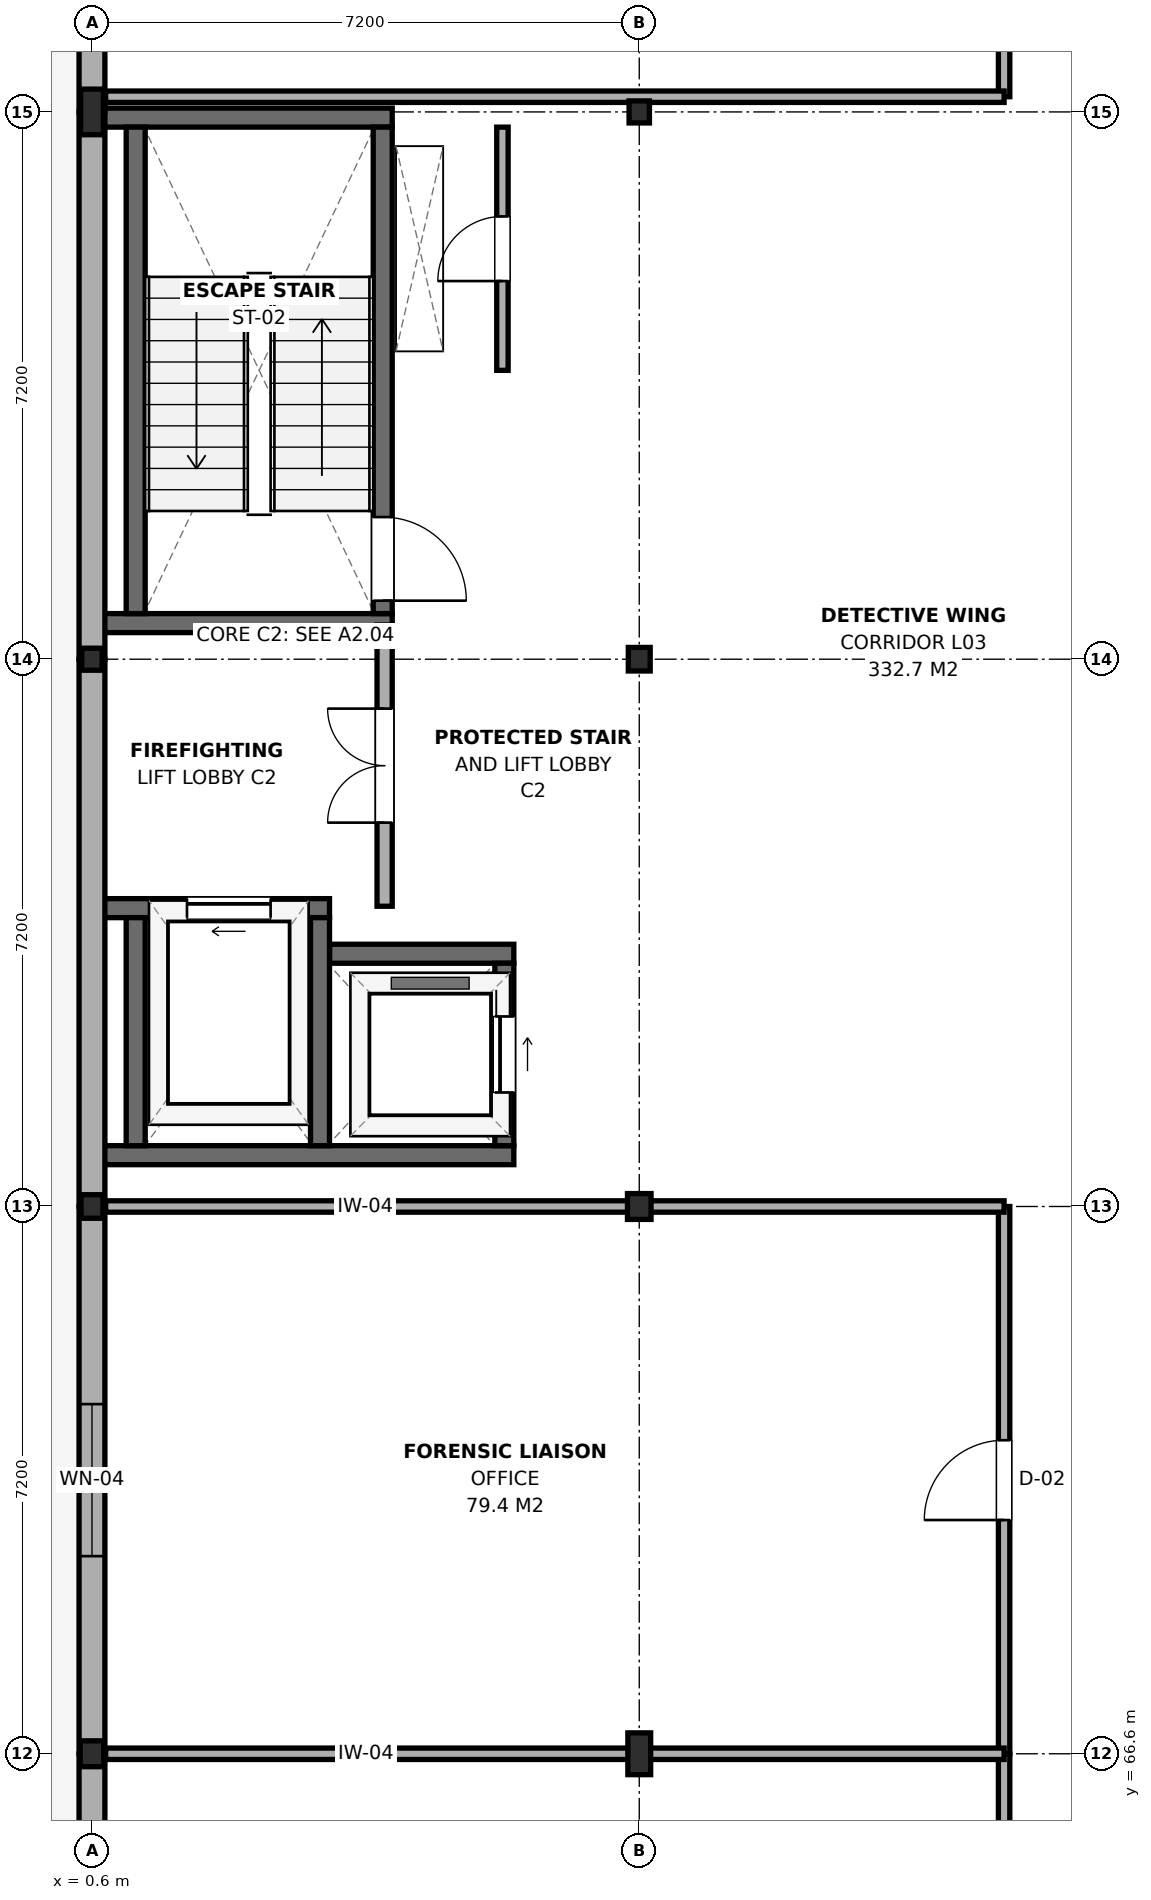
"""IFC4 building model, lengths in metres.
Left out: names, types, materials, properties, quantities, classifications, styles, units other than length and angle.
Written with IfcOpenShell. Run it as: python <this file> out.ifc"""

import sys

from ifc_helpers import new_model, si_unit, direction, frame, frame_2d, origin, origin_2d, place, context, subcontext, project, spatial, rectangle, i_section, extrude, element, fill, save


model = new_model("IFC4")
c1 = context("Model", 3, precision=1e-05, world=origin(), true_north=direction((0.0, 1.0)))
c2 = subcontext(c1, "Body", "Model", "MODEL_VIEW")
j1 = project(units=[si_unit("LENGTHUNIT", "METRE"), si_unit("PLANEANGLEUNIT", "RADIAN")], contexts=[c1])
p1 = place(None, origin())
s1 = spatial("IfcSite", under=j1, at=p1, CompositionType="ELEMENT")
p2 = place(p1, origin())
s2 = spatial("IfcBuilding", under=s1, at=p2, CompositionType="ELEMENT")
p3 = place(p2, frame((0.0, 0.0, 13.2)))
s3 = spatial("IfcBuildingStorey", under=s2, at=p3, CompositionType="ELEMENT", Elevation=13.2)
p4 = place(p3, frame((0.6, 66.6, 0.0), z_axis=(0.0, 0.0, 1.0), x_axis=(1.0, 0.0, 0.0)))
e1 = element("IfcColumn", 1, at=p4, inside=s3, PredefinedType="COLUMN", context=c2, shape_type="SweptSolid", body=[
    extrude(i_section(OverallWidth=0.31, OverallDepth=0.34, WebThickness=0.021, FlangeThickness=0.039, FilletRadius=0.027, at=origin_2d()), origin(), (0.0, 0.0, 1.0), 3.9),
])
p5 = place(p3, frame((0.6, 73.8, 0.0), z_axis=(0.0, 0.0, 1.0), x_axis=(1.0, 0.0, 0.0)))
e2 = element("IfcColumn", 2, at=p5, inside=s3, PredefinedType="COLUMN", context=c2, shape_type="SweptSolid", body=[
    extrude(i_section(OverallWidth=0.288, OverallDepth=0.31, WebThickness=0.019, FlangeThickness=0.033, FilletRadius=0.024, at=origin_2d()), origin(), (0.0, 0.0, 1.0), 3.9),
])
p6 = place(p3, frame((0.6, 81.0, 0.0), z_axis=(0.0, 0.0, 1.0), x_axis=(1.0, 0.0, 0.0)))
e3 = element("IfcColumn", 3, at=p6, inside=s3, PredefinedType="COLUMN", context=c2, shape_type="SweptSolid", body=[
    extrude(i_section(OverallWidth=0.268, OverallDepth=0.29, WebThickness=0.018, FlangeThickness=0.032, FilletRadius=0.024, at=origin_2d()), origin(), (0.0, 0.0, 1.0), 3.9),
])
p7 = place(p3, frame((0.6, 88.2, 0.0), z_axis=(0.0, 0.0, 1.0), x_axis=(1.0, 0.0, 0.0)))
e4 = element("IfcColumn", 4, at=p7, inside=s3, PredefinedType="COLUMN", context=c2, shape_type="SweptSolid", body=[
    extrude(i_section(OverallWidth=0.3, OverallDepth=0.6, WebThickness=0.015, FlangeThickness=0.03, FilletRadius=0.027, at=origin_2d()), origin(), (0.0, 0.0, 1.0), 3.9),
])
p8 = place(p3, frame((7.8, 66.6, 0.0), z_axis=(0.0, 0.0, 1.0), x_axis=(1.0, 0.0, 0.0)))
e5 = element("IfcColumn", 5, at=p8, inside=s3, PredefinedType="COLUMN", context=c2, shape_type="SweptSolid", body=[
    extrude(i_section(OverallWidth=0.3, OverallDepth=0.55, WebThickness=0.015, FlangeThickness=0.029, FilletRadius=0.027, at=origin_2d()), origin(), (0.0, 0.0, 1.0), 3.9),
])
p9 = place(p3, frame((7.8, 73.8, 0.0), z_axis=(0.0, 0.0, 1.0), x_axis=(1.0, 0.0, 0.0)))
e6 = element("IfcColumn", 6, at=p9, inside=s3, PredefinedType="COLUMN", context=c2, shape_type="SweptSolid", body=[
    extrude(i_section(OverallWidth=0.31, OverallDepth=0.34, WebThickness=0.021, FlangeThickness=0.039, FilletRadius=0.027, at=origin_2d()), origin(), (0.0, 0.0, 1.0), 3.9),
])
p10 = place(p3, frame((7.8, 81.0, 0.0), z_axis=(0.0, 0.0, 1.0), x_axis=(1.0, 0.0, 0.0)))
e7 = element("IfcColumn", 7, at=p10, inside=s3, PredefinedType="COLUMN", context=c2, shape_type="SweptSolid", body=[
    extrude(i_section(OverallWidth=0.288, OverallDepth=0.31, WebThickness=0.019, FlangeThickness=0.033, FilletRadius=0.024, at=origin_2d()), origin(), (0.0, 0.0, 1.0), 3.9),
])
p11 = place(p3, frame((7.8, 88.2, 0.0), z_axis=(0.0, 0.0, 1.0), x_axis=(1.0, 0.0, 0.0)))
e8 = element("IfcColumn", 8, at=p11, inside=s3, PredefinedType="COLUMN", context=c2, shape_type="SweptSolid", body=[
    extrude(i_section(OverallWidth=0.268, OverallDepth=0.29, WebThickness=0.018, FlangeThickness=0.032, FilletRadius=0.024, at=origin_2d()), origin(), (0.0, 0.0, 1.0), 3.9),
])
for number, where, z_axis, x_axis in (
    (9, (0.75, 81.475, 0.0), (0.0, 0.0, 1.0), (1.0, 0.0, 0.0)),
    (10, (0.75, 88.125, 0.0), (0.0, 0.0, 1.0), (1.0, 0.0, 0.0)),
):
    element("IfcWall", number, at=place(p3, frame(where, z_axis=z_axis, x_axis=x_axis)), inside=s3, PredefinedType="SHEAR", context=c2, shape_type="SweptSolid", body=[
        extrude(rectangle(XDim=3.8, YDim=0.25, at=frame_2d((1.9, 0.0))), origin(), (0.0, 0.0, 1.0), 3.7),
    ])
p12 = place(p3, frame((1.175, 81.6, 0.0), z_axis=(0.0, 0.0, 1.0), x_axis=(0.0, 1.0, 0.0)))
e11 = element("IfcWall", 11, at=p12, inside=s3, PredefinedType="SHEAR", context=c2, shape_type="SweptSolid", body=[
    extrude(rectangle(XDim=6.4, YDim=0.25, at=frame_2d((3.2, 0.0))), origin(), (0.0, 0.0, 1.0), 3.7),
])
p13 = place(p3, frame((4.425, 81.6, 0.0), z_axis=(0.0, 0.0, 1.0), x_axis=(0.0, 1.0, 0.0)))
e12 = element("IfcWall", 12, at=p13, inside=s3, PredefinedType="SHEAR", context=c2, shape_type="SweptSolid", body=[
    extrude(rectangle(XDim=6.4, YDim=0.25, at=frame_2d((3.2, 0.0))), origin(), (0.0, 0.0, 1.0), 3.7),
])
p14 = place(p13, frame((0.17, 0.0, 0.0)))
e13 = element("IfcOpeningElement", 13, at=p14, cuts=e12, PredefinedType="OPENING", context=c2, shape_type="SweptSolid", body=[
    extrude(rectangle(XDim=1.1, YDim=2.15, at=frame_2d((0.55, 1.075))), frame((0.0, 0.14, 0.0), z_axis=(0.0, -1.0, 0.0), x_axis=(1.0, 0.0, 0.0)), (0.0, 0.0, 1.0), 0.28),
])
p15 = place(p3, frame((0.75, 74.475, 0.0), z_axis=(0.0, 0.0, 1.0), x_axis=(1.0, 0.0, 0.0)))
e14 = element("IfcWall", 14, at=p15, inside=s3, PredefinedType="SHEAR", context=c2, shape_type="SweptSolid", body=[
    extrude(rectangle(XDim=5.4, YDim=0.25, at=frame_2d((2.7, 0.0))), origin(), (0.0, 0.0, 1.0), 3.7),
])
p16 = place(p3, frame((0.75, 77.725, 0.0), z_axis=(0.0, 0.0, 1.0), x_axis=(1.0, 0.0, 0.0)))
e15 = element("IfcWall", 15, at=p16, inside=s3, PredefinedType="SHEAR", context=c2, shape_type="SweptSolid", body=[
    extrude(rectangle(XDim=2.975, YDim=0.25, at=frame_2d((1.488, 0.0))), origin(), (0.0, 0.0, 1.0), 3.7),
])
p17 = place(p16, frame((1.1, 0.0, 0.0)))
e16 = element("IfcOpeningElement", 16, at=p17, cuts=e15, PredefinedType="OPENING", context=c2, shape_type="SweptSolid", body=[
    extrude(rectangle(XDim=1.1, YDim=2.15, at=frame_2d((0.55, 1.075))), frame((0.0, 0.14, 0.0), z_axis=(0.0, -1.0, 0.0), x_axis=(1.0, 0.0, 0.0)), (0.0, 0.0, 1.0), 0.28),
])
p18 = place(p3, frame((3.725, 77.125, 0.0), z_axis=(0.0, 0.0, 1.0), x_axis=(1.0, 0.0, 0.0)))
e17 = element("IfcWall", 17, at=p18, inside=s3, PredefinedType="SHEAR", context=c2, shape_type="SweptSolid", body=[
    extrude(rectangle(XDim=2.425, YDim=0.25, at=frame_2d((1.212, 0.0))), origin(), (0.0, 0.0, 1.0), 3.7),
])
for number, where, z_axis, x_axis in (
    (18, (1.175, 74.6, 0.0), (0.0, 0.0, 1.0), (0.0, 1.0, 0.0)),
    (19, (3.6, 74.6, 0.0), (0.0, 0.0, 1.0), (0.0, 1.0, 0.0)),
):
    element("IfcWall", number, at=place(p3, frame(where, z_axis=z_axis, x_axis=x_axis)), inside=s3, PredefinedType="SHEAR", context=c2, shape_type="SweptSolid", body=[
        extrude(rectangle(XDim=3.0, YDim=0.25, at=frame_2d((1.5, 0.0))), origin(), (0.0, 0.0, 1.0), 3.7),
    ])
p19 = place(p3, frame((6.025, 74.6, 0.0), z_axis=(0.0, 0.0, 1.0), x_axis=(0.0, 1.0, 0.0)))
e20 = element("IfcWall", 20, at=p19, inside=s3, PredefinedType="SHEAR", context=c2, shape_type="SweptSolid", body=[
    extrude(rectangle(XDim=2.4, YDim=0.25, at=frame_2d((1.2, 0.0))), origin(), (0.0, 0.0, 1.0), 3.7),
])
p20 = place(p19, frame((0.7, 0.0, 0.0)))
e21 = element("IfcOpeningElement", 21, at=p20, cuts=e20, PredefinedType="OPENING", context=c2, shape_type="SweptSolid", body=[
    extrude(rectangle(XDim=1.0, YDim=2.15, at=frame_2d((0.5, 1.075))), frame((0.0, 0.14, 0.0), z_axis=(0.0, -1.0, 0.0), x_axis=(1.0, 0.0, 0.0)), (0.0, 0.0, 1.0), 0.28),
])
p21 = place(p3, frame((0.6, 58.8, 0.0), z_axis=(0.0, 0.0, 1.0), x_axis=(0.0, 1.0, 0.0)))
e22 = element("IfcWall", 22, at=p21, inside=s3, PredefinedType="SOLIDWALL", context=c2, shape_type="SweptSolid", body=[
    extrude(rectangle(XDim=7.8, YDim=0.34, at=frame_2d((3.9, 0.0))), origin(), (0.0, 0.0, 1.0), 3.195),
])
p22 = place(p21, frame((2.9, 0.0, 0.9)))
e23 = element("IfcOpeningElement", 23, at=p22, cuts=e22, PredefinedType="OPENING", context=c2, shape_type="SweptSolid", body=[
    extrude(rectangle(XDim=2.0, YDim=1.8, at=frame_2d((1.0, 0.9))), frame((0.0, 0.185, 0.0), z_axis=(0.0, -1.0, 0.0), x_axis=(1.0, 0.0, 0.0)), (0.0, 0.0, 1.0), 0.37),
])
p23 = place(p3, frame((0.6, 66.6, 0.0), z_axis=(0.0, 0.0, 1.0), x_axis=(0.0, 1.0, 0.0)))
e24 = element("IfcWall", 24, at=p23, inside=s3, PredefinedType="SOLIDWALL", context=c2, shape_type="SweptSolid", body=[
    extrude(rectangle(XDim=7.2, YDim=0.34, at=frame_2d((3.6, 0.0))), origin(), (0.0, 0.0, 1.0), 3.195),
])
p24 = place(p23, frame((2.6, 0.0, 0.9)))
e25 = element("IfcOpeningElement", 25, at=p24, cuts=e24, PredefinedType="OPENING", context=c2, shape_type="SweptSolid", body=[
    extrude(rectangle(XDim=2.0, YDim=1.8, at=frame_2d((1.0, 0.9))), frame((0.0, 0.185, 0.0), z_axis=(0.0, -1.0, 0.0), x_axis=(1.0, 0.0, 0.0)), (0.0, 0.0, 1.0), 0.37),
])
p25 = place(p3, frame((0.6, 73.8, 0.0), z_axis=(0.0, 0.0, 1.0), x_axis=(0.0, 1.0, 0.0)))
e26 = element("IfcWall", 26, at=p25, inside=s3, PredefinedType="SOLIDWALL", context=c2, shape_type="SweptSolid", body=[
    extrude(rectangle(XDim=7.2, YDim=0.34, at=frame_2d((3.6, 0.0))), origin(), (0.0, 0.0, 1.0), 3.245),
])
p26 = place(p3, frame((0.6, 81.0, 0.0), z_axis=(0.0, 0.0, 1.0), x_axis=(0.0, 1.0, 0.0)))
e27 = element("IfcWall", 27, at=p26, inside=s3, PredefinedType="SOLIDWALL", context=c2, shape_type="SweptSolid", body=[
    extrude(rectangle(XDim=7.2, YDim=0.34, at=frame_2d((3.6, 0.0))), origin(), (0.0, 0.0, 1.0), 3.345),
])
p27 = place(p3, frame((0.6, 88.2, 0.0), z_axis=(0.0, 0.0, 1.0), x_axis=(0.0, 1.0, 0.0)))
e28 = element("IfcWall", 28, at=p27, inside=s3, PredefinedType="SOLIDWALL", context=c2, shape_type="SweptSolid", body=[
    extrude(rectangle(XDim=7.8, YDim=0.34, at=frame_2d((3.9, 0.0))), origin(), (0.0, 0.0, 1.0), 3.095),
])
p28 = place(p3, frame((4.45, 77.75, 0.0), z_axis=(0.0, 0.0, 1.0), x_axis=(0.0, 1.0, 0.0)))
e29 = element("IfcWall", 29, at=p28, inside=s3, PredefinedType="PARTITIONING", context=c2, shape_type="SweptSolid", body=[
    extrude(rectangle(XDim=3.7, YDim=0.2, at=frame_2d((1.85, 0.0))), origin(), (0.0, 0.0, 1.0), 3.095),
])
p29 = place(p28, frame((1.1, 0.0, 0.0)))
e30 = element("IfcOpeningElement", 30, at=p29, cuts=e29, PredefinedType="OPENING", context=c2, shape_type="SweptSolid", body=[
    extrude(rectangle(XDim=1.5, YDim=2.15, at=frame_2d((0.75, 1.075))), frame((0.0, 0.115, 0.0), z_axis=(0.0, -1.0, 0.0), x_axis=(1.0, 0.0, 0.0)), (0.0, 0.0, 1.0), 0.23),
])
p30 = place(p3, frame((6.0, 84.8, 0.0), z_axis=(0.0, 0.0, 1.0), x_axis=(0.0, 1.0, 0.0)))
e31 = element("IfcWall", 31, at=p30, inside=s3, PredefinedType="PARTITIONING", context=c2, shape_type="SweptSolid", body=[
    extrude(rectangle(XDim=3.2, YDim=0.15, at=frame_2d((1.6, 0.0))), origin(), (0.0, 0.0, 1.0), 3.245),
])
p31 = place(p30, frame((1.175, 0.0, 0.0)))
e32 = element("IfcOpeningElement", 32, at=p31, cuts=e31, PredefinedType="OPENING", context=c2, shape_type="SweptSolid", body=[
    extrude(rectangle(XDim=0.85, YDim=2.1, at=frame_2d((0.425, 1.05))), frame((0.0, 0.09, 0.0), z_axis=(0.0, -1.0, 0.0), x_axis=(1.0, 0.0, 0.0)), (0.0, 0.0, 1.0), 0.18),
])
p32 = place(p3, frame((12.6, 53.2, 0.0), z_axis=(0.0, 0.0, 1.0), x_axis=(0.0, 1.0, 0.0)))
e33 = element("IfcWall", 33, at=p32, inside=s3, PredefinedType="PARTITIONING", context=c2, shape_type="SweptSolid", body=[
    extrude(rectangle(XDim=13.4, YDim=0.15, at=frame_2d((6.7, 0.0))), origin(), (0.0, 0.0, 1.0), 3.145),
])
p33 = place(p32, frame((6.175, 0.0, 0.0)))
e34 = element("IfcOpeningElement", 34, at=p33, cuts=e33, PredefinedType="OPENING", context=c2, shape_type="SweptSolid", body=[
    extrude(rectangle(XDim=1.05, YDim=2.15, at=frame_2d((0.525, 1.075))), frame((0.0, 0.09, 0.0), z_axis=(0.0, -1.0, 0.0), x_axis=(1.0, 0.0, 0.0)), (0.0, 0.0, 1.0), 0.18),
])
p34 = place(p32, frame((8.348, 0.0, 0.95)))
e35 = element("IfcOpeningElement", 35, at=p34, cuts=e33, PredefinedType="OPENING", context=c2, shape_type="SweptSolid", body=[
    extrude(rectangle(XDim=2.6, YDim=1.5, at=frame_2d((1.3, 0.75))), frame((0.0, 0.09, 0.0), z_axis=(0.0, -1.0, 0.0), x_axis=(1.0, 0.0, 0.0)), (0.0, 0.0, 1.0), 0.18),
])
p35 = place(p3, frame((12.6, 66.6, 0.0), z_axis=(0.0, 0.0, 1.0), x_axis=(0.0, 1.0, 0.0)))
e36 = element("IfcWall", 36, at=p35, inside=s3, PredefinedType="PARTITIONING", context=c2, shape_type="SweptSolid", body=[
    extrude(rectangle(XDim=7.2, YDim=0.15, at=frame_2d((3.6, 0.0))), origin(), (0.0, 0.0, 1.0), 3.145),
])
p36 = place(p35, frame((3.075, 0.0, 0.0)))
e37 = element("IfcOpeningElement", 37, at=p36, cuts=e36, PredefinedType="OPENING", context=c2, shape_type="SweptSolid", body=[
    extrude(rectangle(XDim=1.05, YDim=2.15, at=frame_2d((0.525, 1.075))), frame((0.0, 0.09, 0.0), z_axis=(0.0, -1.0, 0.0), x_axis=(1.0, 0.0, 0.0)), (0.0, 0.0, 1.0), 0.18),
])
p37 = place(p3, frame((0.78, 66.6, 0.0), z_axis=(0.0, 0.0, 1.0), x_axis=(1.0, 0.0, 0.0)))
e38 = element("IfcWall", 38, at=p37, inside=s3, PredefinedType="PARTITIONING", context=c2, shape_type="SweptSolid", body=[
    extrude(rectangle(XDim=11.82, YDim=0.15, at=frame_2d((5.91, 0.0))), origin(), (0.0, 0.0, 1.0), 3.095),
])
p38 = place(p3, frame((0.78, 73.8, 0.0), z_axis=(0.0, 0.0, 1.0), x_axis=(1.0, 0.0, 0.0)))
e39 = element("IfcWall", 39, at=p38, inside=s3, PredefinedType="PARTITIONING", context=c2, shape_type="SweptSolid", body=[
    extrude(rectangle(XDim=11.82, YDim=0.15, at=frame_2d((5.91, 0.0))), origin(), (0.0, 0.0, 1.0), 3.245),
])
p39 = place(p3, frame((12.6, 88.4, 0.0), z_axis=(0.0, 0.0, 1.0), x_axis=(0.0, 1.0, 0.0)))
e40 = element("IfcWall", 40, at=p39, inside=s3, PredefinedType="PARTITIONING", context=c2, shape_type="SweptSolid", body=[
    extrude(rectangle(XDim=19.6, YDim=0.15, at=frame_2d((9.8, 0.0))), origin(), (0.0, 0.0, 1.0), 3.145),
])
p40 = place(p39, frame((9.0, 0.0, 0.0)))
e41 = element("IfcOpeningElement", 41, at=p40, cuts=e40, PredefinedType="OPENING", context=c2, shape_type="SweptSolid", body=[
    extrude(rectangle(XDim=1.6, YDim=2.15, at=frame_2d((0.8, 1.075))), frame((0.0, 0.09, 0.0), z_axis=(0.0, -1.0, 0.0), x_axis=(1.0, 0.0, 0.0)), (0.0, 0.0, 1.0), 0.18),
])
p41 = place(p39, frame((3.6, 0.0, 0.95)))
e42 = element("IfcOpeningElement", 42, at=p41, cuts=e40, PredefinedType="OPENING", context=c2, shape_type="SweptSolid", body=[
    extrude(rectangle(XDim=2.6, YDim=1.5, at=frame_2d((1.3, 0.75))), frame((0.0, 0.09, 0.0), z_axis=(0.0, -1.0, 0.0), x_axis=(1.0, 0.0, 0.0)), (0.0, 0.0, 1.0), 0.18),
])
p42 = place(p39, frame((13.4, 0.0, 0.95)))
e43 = element("IfcOpeningElement", 43, at=p42, cuts=e40, PredefinedType="OPENING", context=c2, shape_type="SweptSolid", body=[
    extrude(rectangle(XDim=2.6, YDim=1.5, at=frame_2d((1.3, 0.75))), frame((0.0, 0.09, 0.0), z_axis=(0.0, -1.0, 0.0), x_axis=(1.0, 0.0, 0.0)), (0.0, 0.0, 1.0), 0.18),
])
p43 = place(p3, frame((0.78, 88.4, 0.0), z_axis=(0.0, 0.0, 1.0), x_axis=(1.0, 0.0, 0.0)))
e44 = element("IfcWall", 44, at=p43, inside=s3, PredefinedType="PARTITIONING", context=c2, shape_type="SweptSolid", body=[
    extrude(rectangle(XDim=11.82, YDim=0.15, at=frame_2d((5.91, 0.0))), origin(), (0.0, 0.0, 1.0), 3.095),
])
p44 = place(p24, origin())
e45 = element("IfcWindow", 45, at=p44, inside=s3, PartitioningType="SINGLE_PANEL", PredefinedType="WINDOW", context=c2, shape_type="SweptSolid", body=[
    extrude(rectangle(XDim=2.0, YDim=1.8, at=frame_2d((1.0, 0.9))), frame((0.0, 0.03, 0.0), z_axis=(0.0, -1.0, 0.0), x_axis=(1.0, 0.0, 0.0)), (0.0, 0.0, 1.0), 0.06),
])
fill(e25, e45)
p45 = place(p14, frame((1.1, 0.0, 0.0), z_axis=(0.0, 0.0, 1.0), x_axis=(-1.0, 0.0, 0.0)))
e46 = element("IfcDoor", 46, at=p45, inside=s3, OperationType="SINGLE_SWING_RIGHT", PredefinedType="DOOR", context=c2, shape_type="SweptSolid", body=[
    extrude(rectangle(XDim=1.1, YDim=2.15, at=frame_2d((0.55, 1.075))), frame((0.0, 0.025, 0.0), z_axis=(0.0, -1.0, 0.0), x_axis=(1.0, 0.0, 0.0)), (0.0, 0.0, 1.0), 0.05),
])
fill(e13, e46)
p46 = place(p17, origin())
e47 = element("IfcDoor", 47, at=p46, inside=s3, OperationType="SLIDING_TO_LEFT", PredefinedType="DOOR", context=c2, shape_type="SweptSolid", body=[
    extrude(rectangle(XDim=1.1, YDim=2.15, at=frame_2d((0.55, 1.075))), frame((0.0, 0.025, 0.0), z_axis=(0.0, -1.0, 0.0), x_axis=(1.0, 0.0, 0.0)), (0.0, 0.0, 1.0), 0.05),
])
fill(e16, e47)
p47 = place(p20, frame((1.0, 0.0, 0.0), z_axis=(0.0, 0.0, 1.0), x_axis=(-1.0, 0.0, 0.0)))
e48 = element("IfcDoor", 48, at=p47, inside=s3, OperationType="SLIDING_TO_RIGHT", PredefinedType="DOOR", context=c2, shape_type="SweptSolid", body=[
    extrude(rectangle(XDim=1.0, YDim=2.15, at=frame_2d((0.5, 1.075))), frame((0.0, 0.025, 0.0), z_axis=(0.0, -1.0, 0.0), x_axis=(1.0, 0.0, 0.0)), (0.0, 0.0, 1.0), 0.05),
])
fill(e21, e48)
p48 = place(p29, origin())
e49 = element("IfcDoor", 49, at=p48, inside=s3, OperationType="DOUBLE_DOOR_SINGLE_SWING", PredefinedType="DOOR", context=c2, shape_type="SweptSolid", body=[
    extrude(rectangle(XDim=1.5, YDim=2.15, at=frame_2d((0.75, 1.075))), frame((0.0, 0.025, 0.0), z_axis=(0.0, -1.0, 0.0), x_axis=(1.0, 0.0, 0.0)), (0.0, 0.0, 1.0), 0.05),
])
fill(e30, e49)
p49 = place(p31, origin())
e50 = element("IfcDoor", 50, at=p49, inside=s3, OperationType="SINGLE_SWING_LEFT", PredefinedType="DOOR", context=c2, shape_type="SweptSolid", body=[
    extrude(rectangle(XDim=0.85, YDim=2.1, at=frame_2d((0.425, 1.05))), frame((0.0, 0.025, 0.0), z_axis=(0.0, -1.0, 0.0), x_axis=(1.0, 0.0, 0.0)), (0.0, 0.0, 1.0), 0.05),
])
fill(e32, e50)
p50 = place(p36, origin())
e51 = element("IfcDoor", 51, at=p50, inside=s3, OperationType="SINGLE_SWING_LEFT", PredefinedType="DOOR", context=c2, shape_type="SweptSolid", body=[
    extrude(rectangle(XDim=1.05, YDim=2.15, at=frame_2d((0.525, 1.075))), frame((0.0, 0.025, 0.0), z_axis=(0.0, -1.0, 0.0), x_axis=(1.0, 0.0, 0.0)), (0.0, 0.0, 1.0), 0.05),
])
fill(e37, e51)
save(model, sys.argv[1])
